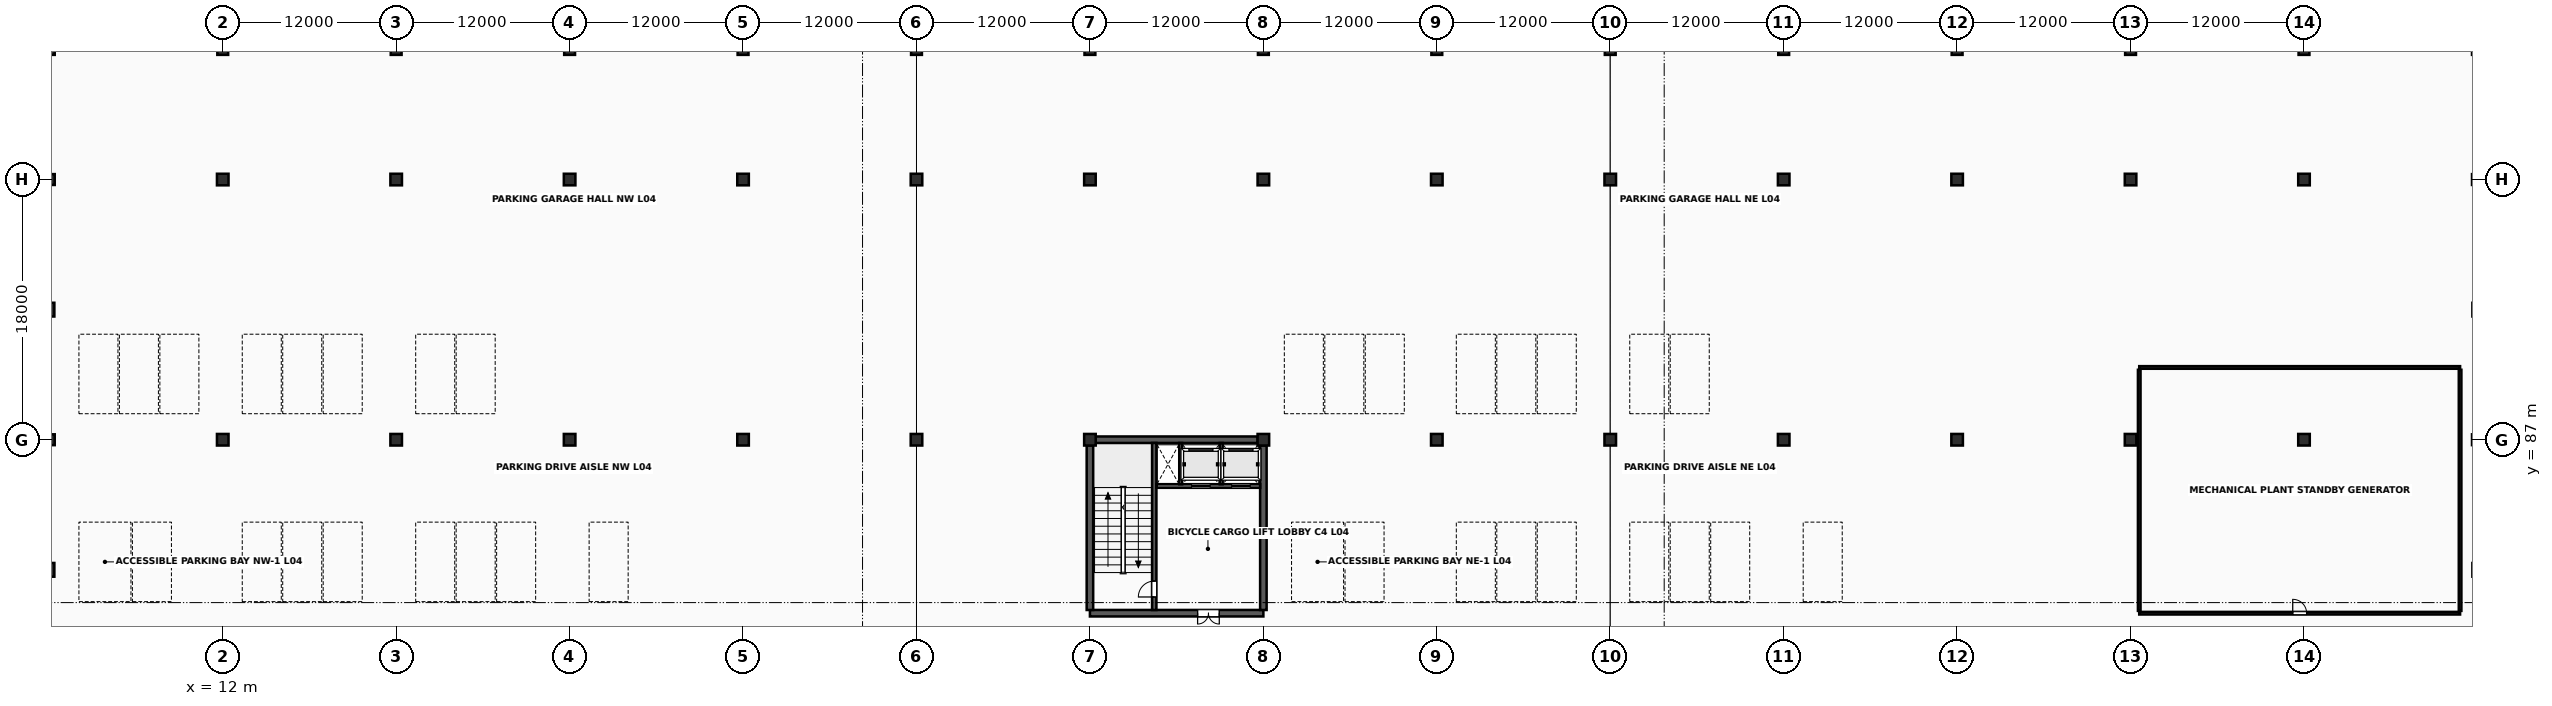
"""IFC4 building model, lengths in metres.
Left out: names, types, materials, properties, quantities, classifications, styles, units other than length and angle.
Written with IfcOpenShell. Run it as: python <this file> out.ifc"""

import sys

from ifc_helpers import new_model, si_unit, direction, frame, frame_2d, origin, origin_2d, place, context, subcontext, project, spatial, rectangle, extrude, element, fill, save


model = new_model("IFC4")
c1 = context("Model", 3, precision=1e-05, world=origin(), true_north=direction((0.0, 1.0)))
c2 = subcontext(c1, "Body", "Model", "MODEL_VIEW")
j1 = project(units=[si_unit("LENGTHUNIT", "METRE"), si_unit("PLANEANGLEUNIT", "RADIAN")], contexts=[c1])
p1 = place(None, origin())
s1 = spatial("IfcSite", under=j1, at=p1, CompositionType="ELEMENT")
p2 = place(p1, origin())
s2 = spatial("IfcBuilding", under=s1, at=p2, CompositionType="ELEMENT")
p3 = place(p2, frame((0.0, 0.0, 17.2)))
s3 = spatial("IfcBuildingStorey", under=s2, at=p3, CompositionType="ELEMENT", Elevation=17.2)
for number, where, z_axis, x_axis in (
    (1, (0.0, 87.0, 0.0), (0.0, 0.0, 1.0), (1.0, 0.0, 0.0)),
    (2, (0.0, 105.0, 0.0), (0.0, 0.0, 1.0), (1.0, 0.0, 0.0)),
    (3, (0.0, 114.0, 0.0), (0.0, 0.0, 1.0), (1.0, 0.0, 0.0)),
):
    element("IfcColumn", number, at=place(p3, frame(where, z_axis=z_axis, x_axis=x_axis)), inside=s3, PredefinedType="COLUMN", context=c2, shape_type="SweptSolid", body=[
        extrude(rectangle(XDim=0.75, YDim=0.75, at=origin_2d()), origin(), (0.0, 0.0, 1.0), 3.8),
    ])
for number, where, z_axis, x_axis in (
    (4, (12.0, 87.0, 0.0), (0.0, 0.0, 1.0), (1.0, 0.0, 0.0)),
    (5, (12.0, 105.0, 0.0), (0.0, 0.0, 1.0), (1.0, 0.0, 0.0)),
):
    element("IfcColumn", number, at=place(p3, frame(where, z_axis=z_axis, x_axis=x_axis)), inside=s3, PredefinedType="COLUMN", context=c2, shape_type="SweptSolid", body=[
        extrude(rectangle(XDim=0.8, YDim=0.8, at=origin_2d()), origin(), (0.0, 0.0, 1.0), 3.8),
    ])
p4 = place(p3, frame((12.0, 114.0, 0.0), z_axis=(0.0, 0.0, 1.0), x_axis=(1.0, 0.0, 0.0)))
e6 = element("IfcColumn", 6, at=p4, inside=s3, PredefinedType="COLUMN", context=c2, shape_type="SweptSolid", body=[
    extrude(rectangle(XDim=0.75, YDim=0.75, at=origin_2d()), origin(), (0.0, 0.0, 1.0), 3.8),
])
for number, where, z_axis, x_axis in (
    (7, (24.0, 87.0, 0.0), (0.0, 0.0, 1.0), (1.0, 0.0, 0.0)),
    (8, (24.0, 105.0, 0.0), (0.0, 0.0, 1.0), (1.0, 0.0, 0.0)),
):
    element("IfcColumn", number, at=place(p3, frame(where, z_axis=z_axis, x_axis=x_axis)), inside=s3, PredefinedType="COLUMN", context=c2, shape_type="SweptSolid", body=[
        extrude(rectangle(XDim=0.8, YDim=0.8, at=origin_2d()), origin(), (0.0, 0.0, 1.0), 3.8),
    ])
p5 = place(p3, frame((24.0, 114.0, 0.0), z_axis=(0.0, 0.0, 1.0), x_axis=(1.0, 0.0, 0.0)))
e9 = element("IfcColumn", 9, at=p5, inside=s3, PredefinedType="COLUMN", context=c2, shape_type="SweptSolid", body=[
    extrude(rectangle(XDim=0.75, YDim=0.75, at=origin_2d()), origin(), (0.0, 0.0, 1.0), 3.8),
])
for number, where, z_axis, x_axis in (
    (10, (36.0, 87.0, 0.0), (0.0, 0.0, 1.0), (1.0, 0.0, 0.0)),
    (11, (36.0, 105.0, 0.0), (0.0, 0.0, 1.0), (1.0, 0.0, 0.0)),
):
    element("IfcColumn", number, at=place(p3, frame(where, z_axis=z_axis, x_axis=x_axis)), inside=s3, PredefinedType="COLUMN", context=c2, shape_type="SweptSolid", body=[
        extrude(rectangle(XDim=0.8, YDim=0.8, at=origin_2d()), origin(), (0.0, 0.0, 1.0), 3.8),
    ])
p6 = place(p3, frame((36.0, 114.0, 0.0), z_axis=(0.0, 0.0, 1.0), x_axis=(1.0, 0.0, 0.0)))
e12 = element("IfcColumn", 12, at=p6, inside=s3, PredefinedType="COLUMN", context=c2, shape_type="SweptSolid", body=[
    extrude(rectangle(XDim=0.75, YDim=0.75, at=origin_2d()), origin(), (0.0, 0.0, 1.0), 3.8),
])
for number, where, z_axis, x_axis in (
    (13, (48.0, 87.0, 0.0), (0.0, 0.0, 1.0), (1.0, 0.0, 0.0)),
    (14, (48.0, 105.0, 0.0), (0.0, 0.0, 1.0), (1.0, 0.0, 0.0)),
):
    element("IfcColumn", number, at=place(p3, frame(where, z_axis=z_axis, x_axis=x_axis)), inside=s3, PredefinedType="COLUMN", context=c2, shape_type="SweptSolid", body=[
        extrude(rectangle(XDim=0.8, YDim=0.8, at=origin_2d()), origin(), (0.0, 0.0, 1.0), 3.8),
    ])
p7 = place(p3, frame((48.0, 114.0, 0.0), z_axis=(0.0, 0.0, 1.0), x_axis=(1.0, 0.0, 0.0)))
e15 = element("IfcColumn", 15, at=p7, inside=s3, PredefinedType="COLUMN", context=c2, shape_type="SweptSolid", body=[
    extrude(rectangle(XDim=0.75, YDim=0.75, at=origin_2d()), origin(), (0.0, 0.0, 1.0), 3.8),
])
for number, where, z_axis, x_axis in (
    (16, (60.0, 87.0, 0.0), (0.0, 0.0, 1.0), (1.0, 0.0, 0.0)),
    (17, (60.0, 105.0, 0.0), (0.0, 0.0, 1.0), (1.0, 0.0, 0.0)),
):
    element("IfcColumn", number, at=place(p3, frame(where, z_axis=z_axis, x_axis=x_axis)), inside=s3, PredefinedType="COLUMN", context=c2, shape_type="SweptSolid", body=[
        extrude(rectangle(XDim=0.8, YDim=0.8, at=origin_2d()), origin(), (0.0, 0.0, 1.0), 3.8),
    ])
p8 = place(p3, frame((60.0, 114.0, 0.0), z_axis=(0.0, 0.0, 1.0), x_axis=(1.0, 0.0, 0.0)))
e18 = element("IfcColumn", 18, at=p8, inside=s3, PredefinedType="COLUMN", context=c2, shape_type="SweptSolid", body=[
    extrude(rectangle(XDim=0.75, YDim=0.75, at=origin_2d()), origin(), (0.0, 0.0, 1.0), 3.8),
])
for number, where, z_axis, x_axis in (
    (19, (72.0, 87.0, 0.0), (0.0, 0.0, 1.0), (1.0, 0.0, 0.0)),
    (20, (72.0, 105.0, 0.0), (0.0, 0.0, 1.0), (1.0, 0.0, 0.0)),
):
    element("IfcColumn", number, at=place(p3, frame(where, z_axis=z_axis, x_axis=x_axis)), inside=s3, PredefinedType="COLUMN", context=c2, shape_type="SweptSolid", body=[
        extrude(rectangle(XDim=0.8, YDim=0.8, at=origin_2d()), origin(), (0.0, 0.0, 1.0), 3.8),
    ])
p9 = place(p3, frame((72.0, 114.0, 0.0), z_axis=(0.0, 0.0, 1.0), x_axis=(1.0, 0.0, 0.0)))
e21 = element("IfcColumn", 21, at=p9, inside=s3, PredefinedType="COLUMN", context=c2, shape_type="SweptSolid", body=[
    extrude(rectangle(XDim=0.75, YDim=0.75, at=origin_2d()), origin(), (0.0, 0.0, 1.0), 3.8),
])
for number, where, z_axis, x_axis in (
    (22, (84.0, 87.0, 0.0), (0.0, 0.0, 1.0), (1.0, 0.0, 0.0)),
    (23, (84.0, 105.0, 0.0), (0.0, 0.0, 1.0), (1.0, 0.0, 0.0)),
):
    element("IfcColumn", number, at=place(p3, frame(where, z_axis=z_axis, x_axis=x_axis)), inside=s3, PredefinedType="COLUMN", context=c2, shape_type="SweptSolid", body=[
        extrude(rectangle(XDim=0.8, YDim=0.8, at=origin_2d()), origin(), (0.0, 0.0, 1.0), 3.8),
    ])
p10 = place(p3, frame((84.0, 114.0, 0.0), z_axis=(0.0, 0.0, 1.0), x_axis=(1.0, 0.0, 0.0)))
e24 = element("IfcColumn", 24, at=p10, inside=s3, PredefinedType="COLUMN", context=c2, shape_type="SweptSolid", body=[
    extrude(rectangle(XDim=0.75, YDim=0.75, at=origin_2d()), origin(), (0.0, 0.0, 1.0), 3.8),
])
for number, where, z_axis, x_axis in (
    (25, (96.0, 87.0, 0.0), (0.0, 0.0, 1.0), (1.0, 0.0, 0.0)),
    (26, (96.0, 105.0, 0.0), (0.0, 0.0, 1.0), (1.0, 0.0, 0.0)),
):
    element("IfcColumn", number, at=place(p3, frame(where, z_axis=z_axis, x_axis=x_axis)), inside=s3, PredefinedType="COLUMN", context=c2, shape_type="SweptSolid", body=[
        extrude(rectangle(XDim=0.8, YDim=0.8, at=origin_2d()), origin(), (0.0, 0.0, 1.0), 3.8),
    ])
p11 = place(p3, frame((96.0, 114.0, 0.0), z_axis=(0.0, 0.0, 1.0), x_axis=(1.0, 0.0, 0.0)))
e27 = element("IfcColumn", 27, at=p11, inside=s3, PredefinedType="COLUMN", context=c2, shape_type="SweptSolid", body=[
    extrude(rectangle(XDim=0.75, YDim=0.75, at=origin_2d()), origin(), (0.0, 0.0, 1.0), 3.8),
])
for number, where, z_axis, x_axis in (
    (28, (108.0, 87.0, 0.0), (0.0, 0.0, 1.0), (1.0, 0.0, 0.0)),
    (29, (108.0, 105.0, 0.0), (0.0, 0.0, 1.0), (1.0, 0.0, 0.0)),
):
    element("IfcColumn", number, at=place(p3, frame(where, z_axis=z_axis, x_axis=x_axis)), inside=s3, PredefinedType="COLUMN", context=c2, shape_type="SweptSolid", body=[
        extrude(rectangle(XDim=0.8, YDim=0.8, at=origin_2d()), origin(), (0.0, 0.0, 1.0), 3.8),
    ])
p12 = place(p3, frame((108.0, 114.0, 0.0), z_axis=(0.0, 0.0, 1.0), x_axis=(1.0, 0.0, 0.0)))
e30 = element("IfcColumn", 30, at=p12, inside=s3, PredefinedType="COLUMN", context=c2, shape_type="SweptSolid", body=[
    extrude(rectangle(XDim=0.75, YDim=0.75, at=origin_2d()), origin(), (0.0, 0.0, 1.0), 3.8),
])
for number, where, z_axis, x_axis in (
    (31, (120.0, 87.0, 0.0), (0.0, 0.0, 1.0), (1.0, 0.0, 0.0)),
    (32, (120.0, 105.0, 0.0), (0.0, 0.0, 1.0), (1.0, 0.0, 0.0)),
):
    element("IfcColumn", number, at=place(p3, frame(where, z_axis=z_axis, x_axis=x_axis)), inside=s3, PredefinedType="COLUMN", context=c2, shape_type="SweptSolid", body=[
        extrude(rectangle(XDim=0.8, YDim=0.8, at=origin_2d()), origin(), (0.0, 0.0, 1.0), 3.8),
    ])
p13 = place(p3, frame((120.0, 114.0, 0.0), z_axis=(0.0, 0.0, 1.0), x_axis=(1.0, 0.0, 0.0)))
e33 = element("IfcColumn", 33, at=p13, inside=s3, PredefinedType="COLUMN", context=c2, shape_type="SweptSolid", body=[
    extrude(rectangle(XDim=0.75, YDim=0.75, at=origin_2d()), origin(), (0.0, 0.0, 1.0), 3.8),
])
for number, where, z_axis, x_axis in (
    (34, (132.0, 87.0, 0.0), (0.0, 0.0, 1.0), (1.0, 0.0, 0.0)),
    (35, (132.0, 105.0, 0.0), (0.0, 0.0, 1.0), (1.0, 0.0, 0.0)),
):
    element("IfcColumn", number, at=place(p3, frame(where, z_axis=z_axis, x_axis=x_axis)), inside=s3, PredefinedType="COLUMN", context=c2, shape_type="SweptSolid", body=[
        extrude(rectangle(XDim=0.8, YDim=0.8, at=origin_2d()), origin(), (0.0, 0.0, 1.0), 3.8),
    ])
p14 = place(p3, frame((132.0, 114.0, 0.0), z_axis=(0.0, 0.0, 1.0), x_axis=(1.0, 0.0, 0.0)))
e36 = element("IfcColumn", 36, at=p14, inside=s3, PredefinedType="COLUMN", context=c2, shape_type="SweptSolid", body=[
    extrude(rectangle(XDim=0.75, YDim=0.75, at=origin_2d()), origin(), (0.0, 0.0, 1.0), 3.8),
])
for number, where, z_axis, x_axis in (
    (37, (144.0, 87.0, 0.0), (0.0, 0.0, 1.0), (1.0, 0.0, 0.0)),
    (38, (144.0, 105.0, 0.0), (0.0, 0.0, 1.0), (1.0, 0.0, 0.0)),
):
    element("IfcColumn", number, at=place(p3, frame(where, z_axis=z_axis, x_axis=x_axis)), inside=s3, PredefinedType="COLUMN", context=c2, shape_type="SweptSolid", body=[
        extrude(rectangle(XDim=0.8, YDim=0.8, at=origin_2d()), origin(), (0.0, 0.0, 1.0), 3.8),
    ])
p15 = place(p3, frame((144.0, 114.0, 0.0), z_axis=(0.0, 0.0, 1.0), x_axis=(1.0, 0.0, 0.0)))
e39 = element("IfcColumn", 39, at=p15, inside=s3, PredefinedType="COLUMN", context=c2, shape_type="SweptSolid", body=[
    extrude(rectangle(XDim=0.75, YDim=0.75, at=origin_2d()), origin(), (0.0, 0.0, 1.0), 3.8),
])
for number, where, z_axis, x_axis in (
    (40, (156.0, 87.0, 0.0), (0.0, 0.0, 1.0), (1.0, 0.0, 0.0)),
    (41, (156.0, 105.0, 0.0), (0.0, 0.0, 1.0), (1.0, 0.0, 0.0)),
):
    element("IfcColumn", number, at=place(p3, frame(where, z_axis=z_axis, x_axis=x_axis)), inside=s3, PredefinedType="COLUMN", context=c2, shape_type="SweptSolid", body=[
        extrude(rectangle(XDim=0.8, YDim=0.8, at=origin_2d()), origin(), (0.0, 0.0, 1.0), 3.8),
    ])
for number, where, z_axis, x_axis in (
    (42, (156.0, 114.0, 0.0), (0.0, 0.0, 1.0), (1.0, 0.0, 0.0)),
    (43, (168.0, 87.0, 0.0), (0.0, 0.0, 1.0), (1.0, 0.0, 0.0)),
    (44, (168.0, 105.0, 0.0), (0.0, 0.0, 1.0), (1.0, 0.0, 0.0)),
    (45, (168.0, 114.0, 0.0), (0.0, 0.0, 1.0), (1.0, 0.0, 0.0)),
):
    element("IfcColumn", number, at=place(p3, frame(where, z_axis=z_axis, x_axis=x_axis)), inside=s3, PredefinedType="COLUMN", context=c2, shape_type="SweptSolid", body=[
        extrude(rectangle(XDim=0.75, YDim=0.75, at=origin_2d()), origin(), (0.0, 0.0, 1.0), 3.8),
    ])
for number, where, z_axis, x_axis in (
    (46, (0.0, 78.0, 0.0), (0.0, 0.0, 1.0), (1.0, 0.0, 0.0)),
    (47, (0.0, 96.0, 0.0), (0.0, 0.0, 1.0), (1.0, 0.0, 0.0)),
    (48, (168.0, 78.0, 0.0), (0.0, 0.0, 1.0), (1.0, 0.0, 0.0)),
    (49, (168.0, 96.0, 0.0), (0.0, 0.0, 1.0), (1.0, 0.0, 0.0)),
):
    element("IfcColumn", number, at=place(p3, frame(where, z_axis=z_axis, x_axis=x_axis)), inside=s3, PredefinedType="PILASTER", context=c2, shape_type="SweptSolid", body=[
        extrude(rectangle(XDim=0.7, YDim=0.95, at=origin_2d()), origin(), (0.0, 0.0, 1.0), 3.8),
    ])
p16 = place(p3, frame((72.0, 75.0, 0.0), z_axis=(0.0, 0.0, 1.0), x_axis=(1.0, 0.0, 0.0)))
e50 = element("IfcWall", 50, at=p16, inside=s3, PredefinedType="SHEAR", context=c2, shape_type="SweptSolid", body=[
    extrude(rectangle(XDim=12.0, YDim=0.45, at=frame_2d((6.0, 0.0))), origin(), (0.0, 0.0, 1.0), 3.643),
])
p17 = place(p16, frame((7.45, 0.0, 0.0)))
e51 = element("IfcOpeningElement", 51, at=p17, cuts=e50, PredefinedType="OPENING", context=c2, shape_type="SweptSolid", body=[
    extrude(rectangle(XDim=1.5, YDim=2.25, at=frame_2d((0.75, 1.125))), frame((0.0, 0.24, 0.0), z_axis=(0.0, -1.0, 0.0), x_axis=(1.0, 0.0, 0.0)), (0.0, 0.0, 1.0), 0.48),
])
p18 = place(p3, frame((72.397, 87.0, 0.0), z_axis=(0.0, 0.0, 1.0), x_axis=(1.0, 0.0, 0.0)))
e52 = element("IfcWall", 52, at=p18, inside=s3, PredefinedType="SHEAR", context=c2, shape_type="SweptSolid", body=[
    extrude(rectangle(XDim=11.206, YDim=0.45, at=frame_2d((5.603, 0.0))), origin(), (0.0, 0.0, 1.0), 3.643),
])
for number, where, z_axis, x_axis in (
    (53, (72.0, 75.222, 0.0), (0.0, 0.0, 1.0), (0.0, 1.0, 0.0)),
    (54, (84.0, 75.222, 0.0), (0.0, 0.0, 1.0), (0.0, 1.0, 0.0)),
):
    element("IfcWall", number, at=place(p3, frame(where, z_axis=z_axis, x_axis=x_axis)), inside=s3, PredefinedType="SHEAR", context=c2, shape_type="SweptSolid", body=[
        extrude(rectangle(XDim=11.381, YDim=0.45, at=frame_2d((5.69, 0.0))), origin(), (0.0, 0.0, 1.0), 3.643),
    ])
p19 = place(p3, frame((76.45, 75.222, 0.0), z_axis=(0.0, 0.0, 1.0), x_axis=(0.0, 1.0, 0.0)))
e55 = element("IfcWall", 55, at=p19, inside=s3, PredefinedType="SHEAR", context=c2, shape_type="SweptSolid", body=[
    extrude(rectangle(XDim=11.556, YDim=0.3, at=frame_2d((5.778, 0.0))), origin(), (0.0, 0.0, 1.0), 3.643),
])
p20 = place(p19, frame((0.9, 0.0, 0.0)))
e56 = element("IfcOpeningElement", 56, at=p20, cuts=e55, PredefinedType="OPENING", context=c2, shape_type="SweptSolid", body=[
    extrude(rectangle(XDim=1.1, YDim=2.2, at=frame_2d((0.55, 1.1))), frame((0.0, 0.165, 0.0), z_axis=(0.0, -1.0, 0.0), x_axis=(1.0, 0.0, 0.0)), (0.0, 0.0, 1.0), 0.33),
])
p21 = place(p3, frame((76.597, 83.8, 0.0), z_axis=(0.0, 0.0, 1.0), x_axis=(1.0, 0.0, 0.0)))
e57 = element("IfcWall", 57, at=p21, inside=s3, PredefinedType="SOLIDWALL", context=c2, shape_type="SweptSolid", body=[
    extrude(rectangle(XDim=7.181, YDim=0.25, at=frame_2d((3.591, 0.0))), origin(), (0.0, 0.0, 1.0), 3.643),
])
p22 = place(p21, frame((2.433, 0.0, 0.0)))
e58 = element("IfcOpeningElement", 58, at=p22, cuts=e57, PredefinedType="OPENING", context=c2, shape_type="SweptSolid", body=[
    extrude(rectangle(XDim=1.3, YDim=2.28, at=frame_2d((0.65, 1.14))), frame((0.0, 0.14, 0.0), z_axis=(0.0, -1.0, 0.0), x_axis=(1.0, 0.0, 0.0)), (0.0, 0.0, 1.0), 0.28),
])
p23 = place(p21, frame((5.203, 0.0, 0.0)))
e59 = element("IfcOpeningElement", 59, at=p23, cuts=e57, PredefinedType="OPENING", context=c2, shape_type="SweptSolid", body=[
    extrude(rectangle(XDim=1.3, YDim=2.28, at=frame_2d((0.65, 1.14))), frame((0.0, 0.14, 0.0), z_axis=(0.0, -1.0, 0.0), x_axis=(1.0, 0.0, 0.0)), (0.0, 0.0, 1.0), 0.28),
])
for number, where, z_axis, x_axis in (
    (60, (78.28, 83.92, 0.0), (0.0, 0.0, 1.0), (0.0, 1.0, 0.0)),
    (61, (81.08, 83.92, 0.0), (0.0, 0.0, 1.0), (0.0, 1.0, 0.0)),
):
    element("IfcWall", number, at=place(p3, frame(where, z_axis=z_axis, x_axis=x_axis)), inside=s3, PredefinedType="SOLIDWALL", context=c2, shape_type="SweptSolid", body=[
        extrude(rectangle(XDim=2.855, YDim=0.2, at=frame_2d((1.427, 0.0))), origin(), (0.0, 0.0, 1.0), 3.633),
    ])
p24 = place(p3, frame((144.6, 75.0, 0.0), z_axis=(0.0, 0.0, 1.0), x_axis=(1.0, 0.0, 0.0)))
e62 = element("IfcWall", 62, at=p24, inside=s3, PredefinedType="SOLIDWALL", context=c2, shape_type="SweptSolid", body=[
    extrude(rectangle(XDim=22.2, YDim=0.18, at=frame_2d((11.1, 0.0))), origin(), (0.0, 0.0, 1.0), 2.75),
])
p25 = place(p24, frame((10.62, 0.0, 0.0)))
e63 = element("IfcOpeningElement", 63, at=p25, cuts=e62, PredefinedType="OPENING", context=c2, shape_type="SweptSolid", body=[
    extrude(rectangle(XDim=0.96, YDim=2.12, at=frame_2d((0.48, 1.06))), frame((0.0, 0.105, 0.0), z_axis=(0.0, -1.0, 0.0), x_axis=(1.0, 0.0, 0.0)), (0.0, 0.0, 1.0), 0.21),
])
p26 = place(p3, frame((144.6, 92.0, 0.0), z_axis=(0.0, 0.0, 1.0), x_axis=(1.0, 0.0, 0.0)))
e64 = element("IfcWall", 64, at=p26, inside=s3, PredefinedType="SOLIDWALL", context=c2, shape_type="SweptSolid", body=[
    extrude(rectangle(XDim=22.2, YDim=0.18, at=frame_2d((11.1, 0.0))), origin(), (0.0, 0.0, 1.0), 2.75),
])
for number, where, z_axis, x_axis in (
    (65, (144.6, 75.16, 0.0), (0.0, 0.0, 1.0), (0.0, 1.0, 0.0)),
    (66, (166.8, 75.16, 0.0), (0.0, 0.0, 1.0), (0.0, 1.0, 0.0)),
):
    element("IfcWall", number, at=place(p3, frame(where, z_axis=z_axis, x_axis=x_axis)), inside=s3, PredefinedType="SOLIDWALL", context=c2, shape_type="SweptSolid", body=[
        extrude(rectangle(XDim=16.68, YDim=0.18, at=frame_2d((8.34, 0.0))), origin(), (0.0, 0.0, 1.0), 2.75),
    ])
p27 = place(p20, origin())
e67 = element("IfcDoor", 67, at=p27, inside=s3, OperationType="SINGLE_SWING_LEFT", PredefinedType="DOOR", context=c2, shape_type="SweptSolid", body=[
    extrude(rectangle(XDim=1.1, YDim=2.2, at=frame_2d((0.55, 1.1))), frame((0.0, 0.025, 0.0), z_axis=(0.0, -1.0, 0.0), x_axis=(1.0, 0.0, 0.0)), (0.0, 0.0, 1.0), 0.05),
])
fill(e56, e67)
p28 = place(p17, origin())
e68 = element("IfcDoor", 68, at=p28, inside=s3, OperationType="DOUBLE_DOOR_SINGLE_SWING", PredefinedType="DOOR", context=c2, shape_type="SweptSolid", body=[
    extrude(rectangle(XDim=1.5, YDim=2.25, at=frame_2d((0.75, 1.125))), frame((0.0, 0.025, 0.0), z_axis=(0.0, -1.0, 0.0), x_axis=(1.0, 0.0, 0.0)), (0.0, 0.0, 1.0), 0.05),
])
fill(e51, e68)
p29 = place(p22, origin())
e69 = element("IfcDoor", 69, at=p29, inside=s3, OperationType="SLIDING_TO_LEFT", PredefinedType="USERDEFINED", context=c2, shape_type="SweptSolid", body=[
    extrude(rectangle(XDim=1.3, YDim=2.28, at=frame_2d((0.65, 1.14))), frame((0.0, 0.025, 0.0), z_axis=(0.0, -1.0, 0.0), x_axis=(1.0, 0.0, 0.0)), (0.0, 0.0, 1.0), 0.05),
])
fill(e58, e69)
p30 = place(p23, origin())
e70 = element("IfcDoor", 70, at=p30, inside=s3, OperationType="SLIDING_TO_LEFT", PredefinedType="USERDEFINED", context=c2, shape_type="SweptSolid", body=[
    extrude(rectangle(XDim=1.3, YDim=2.28, at=frame_2d((0.65, 1.14))), frame((0.0, 0.025, 0.0), z_axis=(0.0, -1.0, 0.0), x_axis=(1.0, 0.0, 0.0)), (0.0, 0.0, 1.0), 0.05),
])
fill(e59, e70)
p31 = place(p25, origin())
e71 = element("IfcDoor", 71, at=p31, inside=s3, OperationType="SINGLE_SWING_LEFT", PredefinedType="DOOR", context=c2, shape_type="SweptSolid", body=[
    extrude(rectangle(XDim=0.96, YDim=2.12, at=frame_2d((0.48, 1.06))), frame((0.0, 0.025, 0.0), z_axis=(0.0, -1.0, 0.0), x_axis=(1.0, 0.0, 0.0)), (0.0, 0.0, 1.0), 0.05),
])
fill(e63, e71)
save(model, sys.argv[1])
